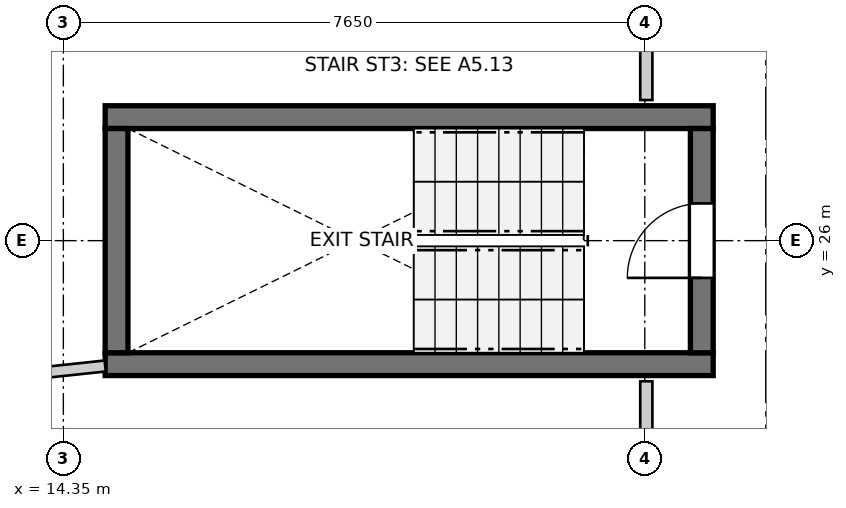
"""IFC4 building model, lengths in metres.
Left out: names, types, materials, properties, quantities, classifications, styles, units other than length and angle.
Written with IfcOpenShell. Run it as: python <this file> out.ifc"""

import sys

from ifc_helpers import new_model, si_unit, direction, frame, frame_2d, origin, place, context, subcontext, project, spatial, rectangle, extrude, source, transform, mapped, element, fill, save


model = new_model("IFC4")
c1 = context("Model", 3, precision=1e-05, world=origin(), true_north=direction((0.0, 1.0)))
c2 = subcontext(c1, "Body", "Model", "MODEL_VIEW")
j1 = project(units=[si_unit("LENGTHUNIT", "METRE"), si_unit("PLANEANGLEUNIT", "RADIAN")], contexts=[c1])
p1 = place(None, origin())
s1 = spatial("IfcSite", under=j1, at=p1, CompositionType="ELEMENT")
p2 = place(p1, origin())
s2 = spatial("IfcBuilding", under=s1, at=p2, CompositionType="ELEMENT")
p3 = place(p2, frame((0.0, 0.0, 11.0)))
s3 = spatial("IfcBuildingStorey", under=s2, at=p3, CompositionType="ELEMENT", Elevation=11.0)
for number, where, z_axis, x_axis in (
    (1, (14.9, 24.375, 0.0), (0.0, 0.0, 1.0), (1.0, 0.0, 0.0)),
    (2, (22.9, 27.625, 0.0), (0.0, 0.0, 1.0), (-1.0, 0.0, 0.0)),
):
    element("IfcWall", number, at=place(p3, frame(where, z_axis=z_axis, x_axis=x_axis)), inside=s3, PredefinedType="SHEAR", context=c2, shape_type="SweptSolid", body=[
        extrude(rectangle(XDim=8.0, YDim=0.3, at=frame_2d((4.0, 0.0))), origin(), (0.0, 0.0, 1.0), 2.94),
    ])
p4 = place(p3, frame((15.05, 27.475, 0.0), z_axis=(0.0, 0.0, 1.0), x_axis=(0.0, -1.0, 0.0)))
e3 = element("IfcWall", 3, at=p4, inside=s3, PredefinedType="SHEAR", context=c2, shape_type="SweptSolid", body=[
    extrude(rectangle(XDim=2.95, YDim=0.3, at=frame_2d((1.475, 0.0))), origin(), (0.0, 0.0, 1.0), 2.94),
])
p5 = place(p3, frame((22.75, 24.525, 0.0), z_axis=(0.0, 0.0, 1.0), x_axis=(0.0, 1.0, 0.0)))
e4 = element("IfcWall", 4, at=p5, inside=s3, PredefinedType="SHEAR", context=c2, shape_type="SweptSolid", body=[
    extrude(rectangle(XDim=2.95, YDim=0.3, at=frame_2d((1.475, 0.0))), origin(), (0.0, 0.0, 1.0), 2.94),
])
p6 = place(p5, frame((0.985, 0.0, 0.0)))
e5 = element("IfcOpeningElement", 5, at=p6, cuts=e4, PredefinedType="OPENING", context=c2, shape_type="SweptSolid", body=[
    extrude(rectangle(XDim=0.98, YDim=2.15, at=frame_2d((0.49, 1.075))), frame((0.0, 0.16, 0.0), z_axis=(0.0, -1.0, 0.0), x_axis=(1.0, 0.0, 0.0)), (0.0, 0.0, 1.0), 0.32),
])
p7 = place(p3, frame((22.02, 27.85, 0.0), z_axis=(0.0, 0.0, 1.0), x_axis=(0.0, 1.0, 0.0)))
e6 = element("IfcWall", 6, at=p7, inside=s3, PredefinedType="PARTITIONING", context=c2, shape_type="SweptSolid", body=[
    extrude(rectangle(XDim=3.625, YDim=0.16, at=frame_2d((1.812, 0.0))), origin(), (0.0, 0.0, 1.0), 2.94),
])
p8 = place(p7, frame((1.353, 0.0, 0.0)))
e7 = element("IfcOpeningElement", 7, at=p8, cuts=e6, PredefinedType="OPENING", context=c2, shape_type="SweptSolid", body=[
    extrude(rectangle(XDim=0.96, YDim=2.1, at=frame_2d((0.48, 1.05))), frame((0.0, 0.09, 0.0), z_axis=(0.0, -1.0, 0.0), x_axis=(1.0, 0.0, 0.0)), (0.0, 0.0, 1.0), 0.18),
])
p9 = place(p3, frame((22.02, 21.233, 0.0), z_axis=(0.0, 0.0, 1.0), x_axis=(0.0, 1.0, 0.0)))
e8 = element("IfcWall", 8, at=p9, inside=s3, PredefinedType="PARTITIONING", context=c2, shape_type="SweptSolid", body=[
    extrude(rectangle(XDim=2.917, YDim=0.16, at=frame_2d((1.458, 0.0))), origin(), (0.0, 0.0, 1.0), 2.94),
])
p10 = place(p9, frame((0.83, 0.0, 0.0)))
e9 = element("IfcOpeningElement", 9, at=p10, cuts=e8, PredefinedType="OPENING", context=c2, shape_type="SweptSolid", body=[
    extrude(rectangle(XDim=1.3, YDim=2.1, at=frame_2d((0.65, 1.05))), frame((0.0, 0.09, 0.0), z_axis=(0.0, -1.0, 0.0), x_axis=(1.0, 0.0, 0.0)), (0.0, 0.0, 1.0), 0.18),
])
p11 = place(p3, frame((4.231, 23.212, 0.0), z_axis=(0.0, 0.0, 1.0), x_axis=(0.994353055544, 0.106122575023, 0.0)))
e10 = element("IfcWall", 10, at=p11, inside=s3, PredefinedType="PARTITIONING", context=c2, shape_type="SweptSolid", body=[
    extrude(rectangle(XDim=10.73, YDim=0.145, at=frame_2d((5.365, 0.0))), origin(), (0.0, 0.0, 1.0), 2.94),
])
m1 = source(origin(), c2, "Body", "SweptSolid", [
    extrude(rectangle(XDim=0.98, YDim=2.15, at=frame_2d((0.49, 1.075))), frame((0.0, 0.025, 0.0), z_axis=(0.0, -1.0, 0.0), x_axis=(1.0, 0.0, 0.0)), (0.0, 0.0, 1.0), 0.05),
])
p12 = place(p6, origin())
e11 = element("IfcDoor", 11, at=p12, inside=s3, OperationType="SINGLE_SWING_LEFT", PredefinedType="DOOR", context=c2, shape_type="MappedRepresentation", body=[
    mapped(m1, transform((0.0, 0.0, 0.0), x_axis=(1.0, 0.0, 0.0), y_axis=(0.0, 1.0, 0.0), z_axis=(0.0, 0.0, 1.0), scale=1.0)),
])
fill(e5, e11)
save(model, sys.argv[1])
